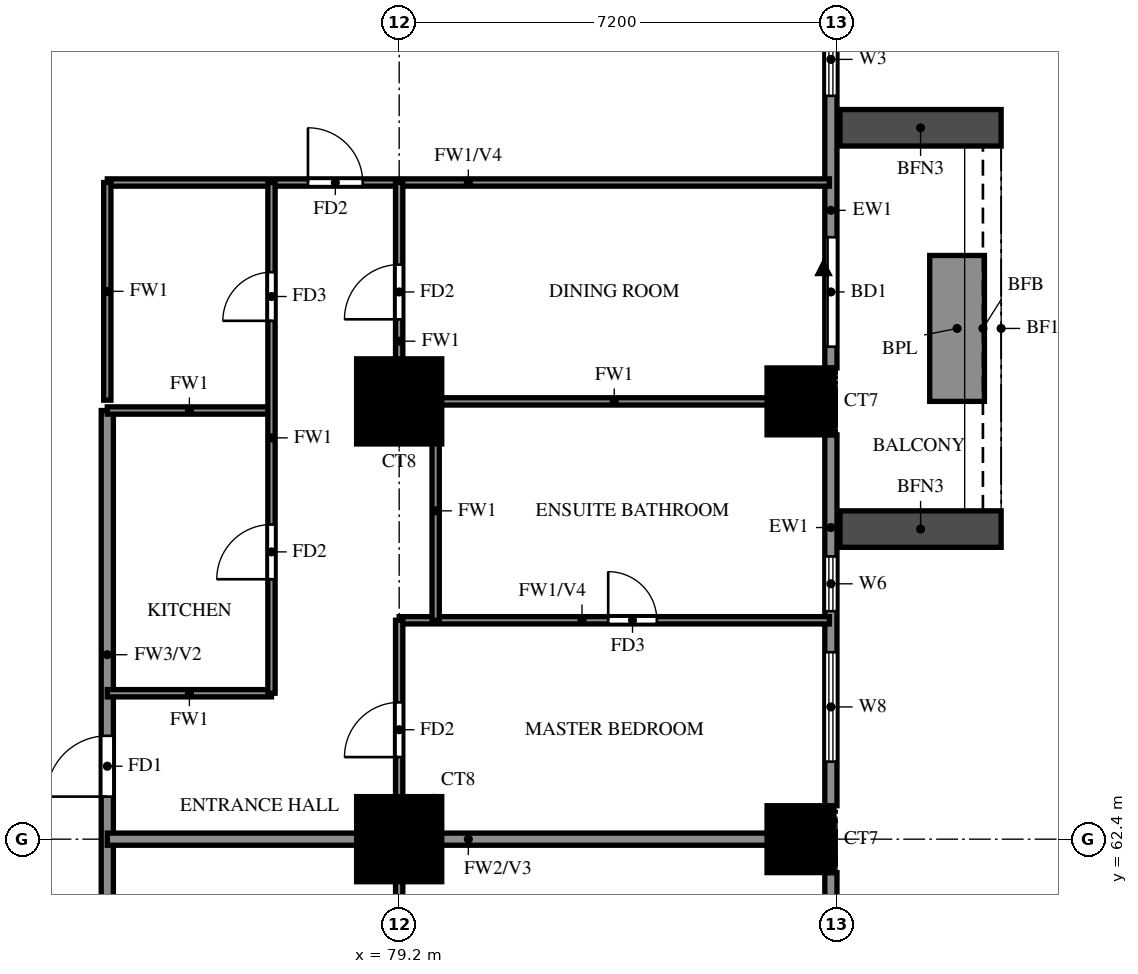
"""IFC4 building model, lengths in metres.
Left out: names, types, materials, properties, quantities, classifications, styles, units other than length and angle.
Written with IfcOpenShell. Run it as: python <this file> out.ifc"""

import sys

from ifc_helpers import new_model, si_unit, direction, frame, frame_2d, origin, origin_2d, place, context, subcontext, project, spatial, rectangle, extrude, source, transform, mapped, element, fill, save


model = new_model("IFC4")
c1 = context("Model", 3, precision=1e-05, world=origin(), true_north=direction((0.0, 1.0)))
c2 = subcontext(c1, "Body", "Model", "MODEL_VIEW")
j1 = project(units=[si_unit("LENGTHUNIT", "METRE"), si_unit("PLANEANGLEUNIT", "RADIAN")], contexts=[c1])
p1 = place(None, origin())
s1 = spatial("IfcSite", under=j1, at=p1, CompositionType="ELEMENT")
p2 = place(p1, origin())
s2 = spatial("IfcBuilding", under=s1, at=p2, CompositionType="ELEMENT")
p3 = place(p2, frame((0.0, 0.0, 48.0)))
s3 = spatial("IfcBuildingStorey", under=s2, at=p3, CompositionType="ELEMENT", Elevation=48.0)
m1 = source(origin(), c2, "Body", "SweptSolid", [
    extrude(rectangle(XDim=1.4, YDim=1.4, at=origin_2d()), origin(), (0.0, 0.0, 1.0), 3.18),
])
p4 = place(p3, frame((79.2, 62.4, 0.0), z_axis=(0.0, 0.0, 1.0), x_axis=(1.0, 0.0, 0.0)))
e1 = element("IfcColumn", 1, at=p4, inside=s3, PredefinedType="COLUMN", context=c2, shape_type="MappedRepresentation", body=[
    mapped(m1, transform((0.0, 0.0, 0.0))),
])
m2 = source(origin(), c2, "Body", "SweptSolid", [
    extrude(rectangle(XDim=1.1, YDim=1.1, at=origin_2d()), origin(), (0.0, 0.0, 1.0), 3.18),
])
p5 = place(p3, frame((85.8, 62.4, 0.0), z_axis=(0.0, 0.0, 1.0), x_axis=(1.0, 0.0, 0.0)))
e2 = element("IfcColumn", 2, at=p5, inside=s3, PredefinedType="COLUMN", context=c2, shape_type="MappedRepresentation", body=[
    mapped(m2, transform((0.0, 0.0, 0.0))),
])
p6 = place(p3, frame((79.2, 69.6, 0.0), z_axis=(0.0, 0.0, 1.0), x_axis=(1.0, 0.0, 0.0)))
e3 = element("IfcColumn", 3, at=p6, inside=s3, PredefinedType="COLUMN", context=c2, shape_type="MappedRepresentation", body=[
    mapped(m1, transform((0.0, 0.0, 0.0))),
])
p7 = place(p3, frame((85.8, 69.6, 0.0), z_axis=(0.0, 0.0, 1.0), x_axis=(1.0, 0.0, 0.0)))
e4 = element("IfcColumn", 4, at=p7, inside=s3, PredefinedType="COLUMN", context=c2, shape_type="MappedRepresentation", body=[
    mapped(m2, transform((0.0, 0.0, 0.0))),
])
p8 = place(p3, frame((86.3, 55.75, 0.0), z_axis=(0.0, 0.0, 1.0), x_axis=(0.0, 1.0, 0.0)))
e5 = element("IfcWall", 5, at=p8, inside=s3, PredefinedType="SOLIDWALL", context=c2, shape_type="SweptSolid", body=[
    extrude(rectangle(XDim=6.1, YDim=0.2, at=frame_2d((3.05, 0.0))), origin(), (0.0, 0.0, 1.0), 3.18),
])
p9 = place(p8, frame((0.35, 0.0, 0.0)))
e6 = element("IfcOpeningElement", 6, at=p9, cuts=e5, PredefinedType="OPENING", context=c2, shape_type="SweptSolid", body=[
    extrude(rectangle(XDim=1.8, YDim=2.4, at=frame_2d((0.9, 1.2))), frame((0.0, 0.11, 0.0), z_axis=(0.0, -1.0, 0.0), x_axis=(1.0, 0.0, 0.0)), (0.0, 0.0, 1.0), 0.22),
])
p10 = place(p8, frame((4.475, 0.0, 0.6)))
e7 = element("IfcOpeningElement", 7, at=p10, cuts=e5, PredefinedType="OPENING", context=c2, shape_type="SweptSolid", body=[
    extrude(rectangle(XDim=1.2, YDim=2.4, at=frame_2d((0.6, 1.2))), frame((0.0, 0.11, 0.0), z_axis=(0.0, -1.0, 0.0), x_axis=(1.0, 0.0, 0.0)), (0.0, 0.0, 1.0), 0.22),
])
p11 = place(p3, frame((86.3, 62.95, 0.0), z_axis=(0.0, 0.0, 1.0), x_axis=(0.0, 1.0, 0.0)))
e8 = element("IfcWall", 8, at=p11, inside=s3, PredefinedType="SOLIDWALL", context=c2, shape_type="SweptSolid", body=[
    extrude(rectangle(XDim=6.1, YDim=0.2, at=frame_2d((3.05, 0.0))), origin(), (0.0, 0.0, 1.0), 3.18),
])
p12 = place(p11, frame((0.725, 0.0, 0.6)))
e9 = element("IfcOpeningElement", 9, at=p12, cuts=e8, PredefinedType="OPENING", context=c2, shape_type="SweptSolid", body=[
    extrude(rectangle(XDim=1.8, YDim=2.4, at=frame_2d((0.9, 1.2))), frame((0.0, 0.11, 0.0), z_axis=(0.0, -1.0, 0.0), x_axis=(1.0, 0.0, 0.0)), (0.0, 0.0, 1.0), 0.22),
])
p13 = place(p11, frame((3.2, 0.0, 1.5)))
e10 = element("IfcOpeningElement", 10, at=p13, cuts=e8, PredefinedType="OPENING", context=c2, shape_type="SweptSolid", body=[
    extrude(rectangle(XDim=0.9, YDim=0.9, at=frame_2d((0.45, 0.45))), frame((0.0, 0.11, 0.0), z_axis=(0.0, -1.0, 0.0), x_axis=(1.0, 0.0, 0.0)), (0.0, 0.0, 1.0), 0.22),
])
p14 = place(p3, frame((86.3, 70.15, 0.0), z_axis=(0.0, 0.0, 1.0), x_axis=(0.0, 1.0, 0.0)))
e11 = element("IfcWall", 11, at=p14, inside=s3, PredefinedType="SOLIDWALL", context=c2, shape_type="SweptSolid", body=[
    extrude(rectangle(XDim=6.1, YDim=0.2, at=frame_2d((3.05, 0.0))), origin(), (0.0, 0.0, 1.0), 3.18),
])
p15 = place(p14, frame((0.35, 0.0, 0.0)))
e12 = element("IfcOpeningElement", 12, at=p15, cuts=e11, PredefinedType="OPENING", context=c2, shape_type="SweptSolid", body=[
    extrude(rectangle(XDim=1.8, YDim=2.4, at=frame_2d((0.9, 1.2))), frame((0.0, 0.11, 0.0), z_axis=(0.0, -1.0, 0.0), x_axis=(1.0, 0.0, 0.0)), (0.0, 0.0, 1.0), 0.22),
])
p16 = place(p14, frame((4.475, 0.0, 0.6)))
e13 = element("IfcOpeningElement", 13, at=p16, cuts=e11, PredefinedType="OPENING", context=c2, shape_type="SweptSolid", body=[
    extrude(rectangle(XDim=1.2, YDim=2.4, at=frame_2d((0.6, 1.2))), frame((0.0, 0.11, 0.0), z_axis=(0.0, -1.0, 0.0), x_axis=(1.0, 0.0, 0.0)), (0.0, 0.0, 1.0), 0.22),
])
for number, where, z_axis, x_axis in (
    (14, (86.45, 67.5, 0.0), (0.0, 0.0, 1.0), (1.0, 0.0, 0.0)),
    (15, (86.45, 74.1, 0.0), (0.0, 0.0, 1.0), (1.0, 0.0, 0.0)),
):
    element("IfcWall", number, at=place(p3, frame(where, z_axis=z_axis, x_axis=x_axis)), inside=s3, PredefinedType="SOLIDWALL", context=c2, shape_type="SweptSolid", body=[
        extrude(rectangle(XDim=2.65, YDim=0.6, at=frame_2d((1.325, 0.0))), origin(), (0.0, 0.0, 1.0), 2.85),
    ])
p17 = place(p3, frame((88.375, 69.6, 0.0), z_axis=(0.0, 0.0, 1.0), x_axis=(0.0, 1.0, 0.0)))
e16 = element("IfcWall", 16, at=p17, inside=s3, PredefinedType="SOLIDWALL", context=c2, shape_type="SweptSolid", body=[
    extrude(rectangle(XDim=2.4, YDim=0.9, at=frame_2d((1.2, 0.0))), origin(), (0.0, 0.0, 1.0), 0.9),
])
p18 = place(p3, frame((74.4, 60.0, 0.0), z_axis=(0.0, 0.0, 1.0), x_axis=(0.0, 1.0, 0.0)))
e17 = element("IfcWall", 17, at=p18, inside=s3, PredefinedType="SOLIDWALL", context=c2, shape_type="SweptSolid", body=[
    extrude(rectangle(XDim=9.45, YDim=0.2, at=frame_2d((4.725, 0.0))), origin(), (0.0, 0.0, 1.0), 3.18),
])
p19 = place(p18, frame((3.1, 0.0, 0.0)))
e18 = element("IfcOpeningElement", 18, at=p19, cuts=e17, PredefinedType="OPENING", context=c2, shape_type="SweptSolid", body=[
    extrude(rectangle(XDim=1.0, YDim=2.1, at=frame_2d((0.5, 1.05))), frame((0.0, 0.11, 0.0), z_axis=(0.0, -1.0, 0.0), x_axis=(1.0, 0.0, 0.0)), (0.0, 0.0, 1.0), 0.22),
])
p20 = place(p3, frame((74.4, 62.4, 0.0), z_axis=(0.0, 0.0, 1.0), x_axis=(1.0, 0.0, 0.0)))
e19 = element("IfcWall", 19, at=p20, inside=s3, PredefinedType="SOLIDWALL", context=c2, shape_type="SweptSolid", body=[
    extrude(rectangle(XDim=11.875, YDim=0.2, at=frame_2d((5.938, 0.0))), origin(), (0.0, 0.0, 1.0), 3.18),
])
p21 = place(p3, frame((74.4, 64.8, 0.0), z_axis=(0.0, 0.0, 1.0), x_axis=(1.0, 0.0, 0.0)))
e20 = element("IfcWall", 20, at=p21, inside=s3, PredefinedType="PARTITIONING", context=c2, shape_type="SweptSolid", body=[
    extrude(rectangle(XDim=2.7, YDim=0.12, at=frame_2d((1.35, 0.0))), origin(), (0.0, 0.0, 1.0), 3.18),
])
p22 = place(p3, frame((79.2, 66.0, 0.0), z_axis=(0.0, 0.0, 1.0), x_axis=(1.0, 0.0, 0.0)))
e21 = element("IfcWall", 21, at=p22, inside=s3, PredefinedType="PARTITIONING", context=c2, shape_type="SweptSolid", body=[
    extrude(rectangle(XDim=7.075, YDim=0.12, at=frame_2d((3.538, 0.0))), origin(), (0.0, 0.0, 1.0), 2.28),
])
p23 = place(p22, frame((3.438, 0.0, 0.0)))
e22 = element("IfcOpeningElement", 22, at=p23, cuts=e21, PredefinedType="OPENING", context=c2, shape_type="SweptSolid", body=[
    extrude(rectangle(XDim=0.8, YDim=2.1, at=frame_2d((0.4, 1.05))), frame((0.0, 0.07, 0.0), z_axis=(0.0, -1.0, 0.0), x_axis=(1.0, 0.0, 0.0)), (0.0, 0.0, 1.0), 0.14),
])
p24 = place(p3, frame((74.4, 69.45, 0.0), z_axis=(0.0, 0.0, 1.0), x_axis=(1.0, 0.0, 0.0)))
e23 = element("IfcWall", 23, at=p24, inside=s3, PredefinedType="PARTITIONING", context=c2, shape_type="SweptSolid", body=[
    extrude(rectangle(XDim=2.7, YDim=0.12, at=frame_2d((1.35, 0.0))), origin(), (0.0, 0.0, 1.0), 3.18),
])
p25 = place(p3, frame((79.2, 69.6, 0.0), z_axis=(0.0, 0.0, 1.0), x_axis=(1.0, 0.0, 0.0)))
e24 = element("IfcWall", 24, at=p25, inside=s3, PredefinedType="PARTITIONING", context=c2, shape_type="SweptSolid", body=[
    extrude(rectangle(XDim=7.075, YDim=0.12, at=frame_2d((3.538, 0.0))), origin(), (0.0, 0.0, 1.0), 3.18),
])
p26 = place(p3, frame((74.4, 73.2, 0.0), z_axis=(0.0, 0.0, 1.0), x_axis=(1.0, 0.0, 0.0)))
e25 = element("IfcWall", 25, at=p26, inside=s3, PredefinedType="PARTITIONING", context=c2, shape_type="SweptSolid", body=[
    extrude(rectangle(XDim=11.875, YDim=0.12, at=frame_2d((5.938, 0.0))), origin(), (0.0, 0.0, 1.0), 2.28),
])
p27 = place(p26, frame((3.3, 0.0, 0.0)))
e26 = element("IfcOpeningElement", 26, at=p27, cuts=e25, PredefinedType="OPENING", context=c2, shape_type="SweptSolid", body=[
    extrude(rectangle(XDim=0.9, YDim=2.1, at=frame_2d((0.45, 1.05))), frame((0.0, 0.07, 0.0), z_axis=(0.0, -1.0, 0.0), x_axis=(1.0, 0.0, 0.0)), (0.0, 0.0, 1.0), 0.14),
])
p28 = place(p3, frame((74.4, 69.62, 0.0), z_axis=(0.0, 0.0, 1.0), x_axis=(0.0, 1.0, 0.0)))
e27 = element("IfcWall", 27, at=p28, inside=s3, PredefinedType="PARTITIONING", context=c2, shape_type="SweptSolid", body=[
    extrude(rectangle(XDim=3.58, YDim=0.12, at=frame_2d((1.79, 0.0))), origin(), (0.0, 0.0, 1.0), 3.18),
])
p29 = place(p3, frame((77.1, 64.8, 0.0), z_axis=(0.0, 0.0, 1.0), x_axis=(0.0, 1.0, 0.0)))
e28 = element("IfcWall", 28, at=p29, inside=s3, PredefinedType="PARTITIONING", context=c2, shape_type="SweptSolid", body=[
    extrude(rectangle(XDim=8.4, YDim=0.12, at=frame_2d((4.2, 0.0))), origin(), (0.0, 0.0, 1.0), 3.18),
])
p30 = place(p29, frame((1.875, 0.0, 0.0)))
e29 = element("IfcOpeningElement", 29, at=p30, cuts=e28, PredefinedType="OPENING", context=c2, shape_type="SweptSolid", body=[
    extrude(rectangle(XDim=0.9, YDim=2.1, at=frame_2d((0.45, 1.05))), frame((0.0, 0.07, 0.0), z_axis=(0.0, -1.0, 0.0), x_axis=(1.0, 0.0, 0.0)), (0.0, 0.0, 1.0), 0.14),
])
p31 = place(p29, frame((6.125, 0.0, 0.0)))
e30 = element("IfcOpeningElement", 30, at=p31, cuts=e28, PredefinedType="OPENING", context=c2, shape_type="SweptSolid", body=[
    extrude(rectangle(XDim=0.8, YDim=2.1, at=frame_2d((0.4, 1.05))), frame((0.0, 0.07, 0.0), z_axis=(0.0, -1.0, 0.0), x_axis=(1.0, 0.0, 0.0)), (0.0, 0.0, 1.0), 0.14),
])
p32 = place(p3, frame((79.2, 48.125, 0.0), z_axis=(0.0, 0.0, 1.0), x_axis=(0.0, 1.0, 0.0)))
e31 = element("IfcWall", 31, at=p32, inside=s3, PredefinedType="PARTITIONING", context=c2, shape_type="SweptSolid", body=[
    extrude(rectangle(XDim=17.875, YDim=0.12, at=frame_2d((8.938, 0.0))), origin(), (0.0, 0.0, 1.0), 3.18),
])
p33 = place(p32, frame((1.288, 0.0, 0.0)))
e32 = element("IfcOpeningElement", 32, at=p33, cuts=e31, PredefinedType="OPENING", context=c2, shape_type="SweptSolid", body=[
    extrude(rectangle(XDim=0.9, YDim=2.1, at=frame_2d((0.45, 1.05))), frame((0.0, 0.07, 0.0), z_axis=(0.0, -1.0, 0.0), x_axis=(1.0, 0.0, 0.0)), (0.0, 0.0, 1.0), 0.14),
])
p34 = place(p32, frame((7.825, 0.0, 0.0)))
e33 = element("IfcOpeningElement", 33, at=p34, cuts=e31, PredefinedType="OPENING", context=c2, shape_type="SweptSolid", body=[
    extrude(rectangle(XDim=1.5, YDim=2.1, at=frame_2d((0.75, 1.05))), frame((0.0, 0.07, 0.0), z_axis=(0.0, -1.0, 0.0), x_axis=(1.0, 0.0, 0.0)), (0.0, 0.0, 1.0), 0.14),
])
p35 = place(p32, frame((12.025, 0.0, 0.0)))
e34 = element("IfcOpeningElement", 34, at=p35, cuts=e31, PredefinedType="OPENING", context=c2, shape_type="SweptSolid", body=[
    extrude(rectangle(XDim=0.9, YDim=2.1, at=frame_2d((0.45, 1.05))), frame((0.0, 0.07, 0.0), z_axis=(0.0, -1.0, 0.0), x_axis=(1.0, 0.0, 0.0)), (0.0, 0.0, 1.0), 0.14),
])
p36 = place(p32, frame((15.625, 0.0, 0.0)))
e35 = element("IfcOpeningElement", 35, at=p36, cuts=e31, PredefinedType="OPENING", context=c2, shape_type="SweptSolid", body=[
    extrude(rectangle(XDim=0.9, YDim=2.1, at=frame_2d((0.45, 1.05))), frame((0.0, 0.07, 0.0), z_axis=(0.0, -1.0, 0.0), x_axis=(1.0, 0.0, 0.0)), (0.0, 0.0, 1.0), 0.14),
])
p37 = place(p3, frame((79.2, 69.6, 0.0), z_axis=(0.0, 0.0, 1.0), x_axis=(0.0, 1.0, 0.0)))
e36 = element("IfcWall", 36, at=p37, inside=s3, PredefinedType="PARTITIONING", context=c2, shape_type="SweptSolid", body=[
    extrude(rectangle(XDim=3.6, YDim=0.12, at=frame_2d((1.8, 0.0))), origin(), (0.0, 0.0, 1.0), 3.18),
])
p38 = place(p37, frame((1.35, 0.0, 0.0)))
e37 = element("IfcOpeningElement", 37, at=p38, cuts=e36, PredefinedType="OPENING", context=c2, shape_type="SweptSolid", body=[
    extrude(rectangle(XDim=0.9, YDim=2.1, at=frame_2d((0.45, 1.05))), frame((0.0, 0.07, 0.0), z_axis=(0.0, -1.0, 0.0), x_axis=(1.0, 0.0, 0.0)), (0.0, 0.0, 1.0), 0.14),
])
p39 = place(p3, frame((79.8, 66.0, 0.0), z_axis=(0.0, 0.0, 1.0), x_axis=(0.0, 1.0, 0.0)))
e38 = element("IfcWall", 38, at=p39, inside=s3, PredefinedType="PARTITIONING", context=c2, shape_type="SweptSolid", body=[
    extrude(rectangle(XDim=3.6, YDim=0.12, at=frame_2d((1.8, 0.0))), origin(), (0.0, 0.0, 1.0), 3.18),
])
p40 = place(p12, origin())
e39 = element("IfcWindow", 39, at=p40, inside=s3, PartitioningType="DOUBLE_PANEL_VERTICAL", PredefinedType="WINDOW", context=c2, shape_type="SweptSolid", body=[
    extrude(rectangle(XDim=1.8, YDim=2.4, at=frame_2d((0.9, 1.2))), frame((0.0, 0.03, 0.0), z_axis=(0.0, -1.0, 0.0), x_axis=(1.0, 0.0, 0.0)), (0.0, 0.0, 1.0), 0.06),
])
fill(e9, e39)
p41 = place(p13, origin())
e40 = element("IfcWindow", 40, at=p41, inside=s3, PartitioningType="SINGLE_PANEL", PredefinedType="WINDOW", context=c2, shape_type="SweptSolid", body=[
    extrude(rectangle(XDim=0.9, YDim=0.9, at=frame_2d((0.45, 0.45))), frame((0.0, 0.03, 0.0), z_axis=(0.0, -1.0, 0.0), x_axis=(1.0, 0.0, 0.0)), (0.0, 0.0, 1.0), 0.06),
])
fill(e10, e40)
p42 = place(p15, origin())
e41 = element("IfcDoor", 41, at=p42, inside=s3, OperationType="DOUBLE_DOOR_SLIDING", PredefinedType="DOOR", context=c2, shape_type="SweptSolid", body=[
    extrude(rectangle(XDim=1.8, YDim=2.4, at=frame_2d((0.9, 1.2))), frame((0.0, 0.025, 0.0), z_axis=(0.0, -1.0, 0.0), x_axis=(1.0, 0.0, 0.0)), (0.0, 0.0, 1.0), 0.05),
])
fill(e12, e41)
p43 = place(p16, origin())
e42 = element("IfcWindow", 42, at=p43, inside=s3, PartitioningType="SINGLE_PANEL", PredefinedType="WINDOW", context=c2, shape_type="SweptSolid", body=[
    extrude(rectangle(XDim=1.2, YDim=2.4, at=frame_2d((0.6, 1.2))), frame((0.0, 0.03, 0.0), z_axis=(0.0, -1.0, 0.0), x_axis=(1.0, 0.0, 0.0)), (0.0, 0.0, 1.0), 0.06),
])
fill(e13, e42)
p44 = place(p19, origin())
e43 = element("IfcDoor", 43, at=p44, inside=s3, OperationType="SINGLE_SWING_RIGHT", PredefinedType="DOOR", context=c2, shape_type="SweptSolid", body=[
    extrude(rectangle(XDim=1.0, YDim=2.1, at=frame_2d((0.5, 1.05))), frame((0.0, 0.025, 0.0), z_axis=(0.0, -1.0, 0.0), x_axis=(1.0, 0.0, 0.0)), (0.0, 0.0, 1.0), 0.05),
])
fill(e18, e43)
p45 = place(p36, origin())
e44 = element("IfcDoor", 44, at=p45, inside=s3, OperationType="SINGLE_SWING_LEFT", PredefinedType="DOOR", context=c2, shape_type="SweptSolid", body=[
    extrude(rectangle(XDim=0.9, YDim=2.1, at=frame_2d((0.45, 1.05))), frame((0.0, 0.025, 0.0), z_axis=(0.0, -1.0, 0.0), x_axis=(1.0, 0.0, 0.0)), (0.0, 0.0, 1.0), 0.05),
])
fill(e35, e44)
p46 = place(p23, origin())
e45 = element("IfcDoor", 45, at=p46, inside=s3, OperationType="SINGLE_SWING_LEFT", PredefinedType="DOOR", context=c2, shape_type="SweptSolid", body=[
    extrude(rectangle(XDim=0.8, YDim=2.1, at=frame_2d((0.4, 1.05))), frame((0.0, 0.025, 0.0), z_axis=(0.0, -1.0, 0.0), x_axis=(1.0, 0.0, 0.0)), (0.0, 0.0, 1.0), 0.05),
])
fill(e22, e45)
p47 = place(p38, origin())
e46 = element("IfcDoor", 46, at=p47, inside=s3, OperationType="SINGLE_SWING_RIGHT", PredefinedType="DOOR", context=c2, shape_type="SweptSolid", body=[
    extrude(rectangle(XDim=0.9, YDim=2.1, at=frame_2d((0.45, 1.05))), frame((0.0, 0.025, 0.0), z_axis=(0.0, -1.0, 0.0), x_axis=(1.0, 0.0, 0.0)), (0.0, 0.0, 1.0), 0.05),
])
fill(e37, e46)
p48 = place(p27, origin())
e47 = element("IfcDoor", 47, at=p48, inside=s3, OperationType="SINGLE_SWING_LEFT", PredefinedType="DOOR", context=c2, shape_type="SweptSolid", body=[
    extrude(rectangle(XDim=0.9, YDim=2.1, at=frame_2d((0.45, 1.05))), frame((0.0, 0.025, 0.0), z_axis=(0.0, -1.0, 0.0), x_axis=(1.0, 0.0, 0.0)), (0.0, 0.0, 1.0), 0.05),
])
fill(e26, e47)
p49 = place(p30, origin())
e48 = element("IfcDoor", 48, at=p49, inside=s3, OperationType="SINGLE_SWING_LEFT", PredefinedType="DOOR", context=c2, shape_type="SweptSolid", body=[
    extrude(rectangle(XDim=0.9, YDim=2.1, at=frame_2d((0.45, 1.05))), frame((0.0, 0.025, 0.0), z_axis=(0.0, -1.0, 0.0), x_axis=(1.0, 0.0, 0.0)), (0.0, 0.0, 1.0), 0.05),
])
fill(e29, e48)
p50 = place(p31, origin())
e49 = element("IfcDoor", 49, at=p50, inside=s3, OperationType="SINGLE_SWING_RIGHT", PredefinedType="DOOR", context=c2, shape_type="SweptSolid", body=[
    extrude(rectangle(XDim=0.8, YDim=2.1, at=frame_2d((0.4, 1.05))), frame((0.0, 0.025, 0.0), z_axis=(0.0, -1.0, 0.0), x_axis=(1.0, 0.0, 0.0)), (0.0, 0.0, 1.0), 0.05),
])
fill(e30, e49)
save(model, sys.argv[1])
